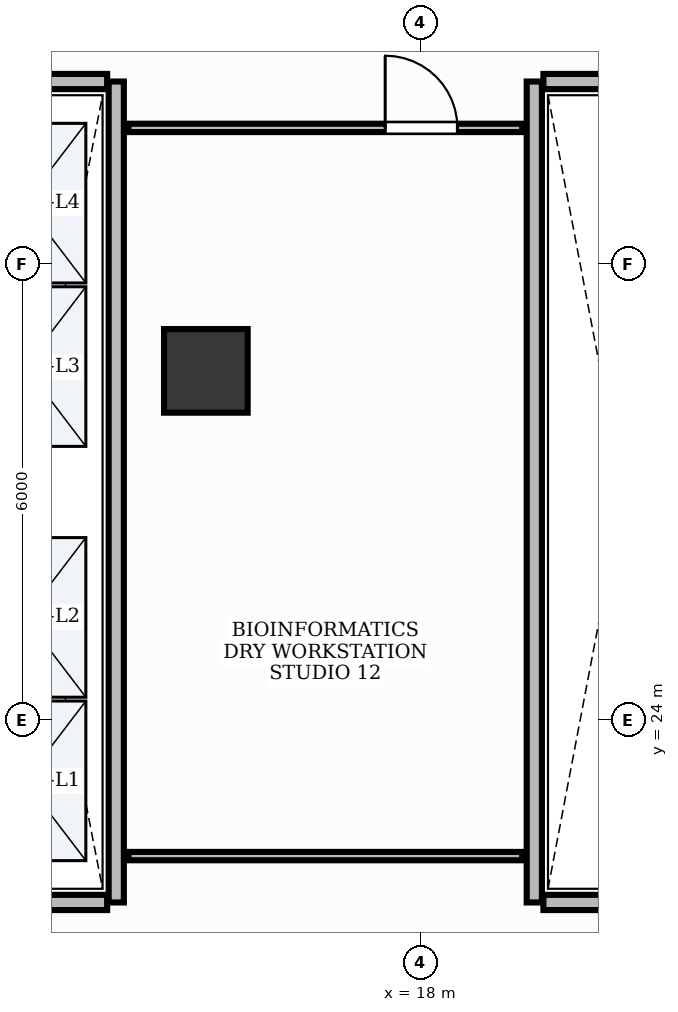
"""IFC4 building model, lengths in metres.
Left out: names, types, materials, properties, quantities, classifications, styles, units other than length and angle.
Written with IfcOpenShell. Run it as: python <this file> out.ifc"""

import sys

from ifc_helpers import new_model, si_unit, direction, frame, frame_2d, origin, origin_2d, place, context, subcontext, project, spatial, rectangle, extrude, element, fill, save


model = new_model("IFC4")
c1 = context("Model", 3, precision=1e-05, world=origin(), true_north=direction((0.0, 1.0)))
c2 = subcontext(c1, "Body", "Model", "MODEL_VIEW")
j1 = project(units=[si_unit("LENGTHUNIT", "METRE"), si_unit("PLANEANGLEUNIT", "RADIAN")], contexts=[c1])
p1 = place(None, origin())
s1 = spatial("IfcSite", under=j1, at=p1, CompositionType="ELEMENT")
p2 = place(p1, origin())
s2 = spatial("IfcBuilding", under=s1, at=p2, CompositionType="ELEMENT")
p3 = place(p2, frame((0.0, 0.0, 80.4)))
s3 = spatial("IfcBuildingStorey", under=s2, at=p3, CompositionType="ELEMENT", Elevation=80.4)
p4 = place(p3, frame((15.179, 28.594, -0.0), z_axis=(0.0, 0.0, 1.0), x_axis=(1.0, 0.0, 0.0)))
e1 = element("IfcColumn", 1, at=p4, inside=s3, PredefinedType="COLUMN", context=c2, shape_type="SweptSolid", body=[
    extrude(rectangle(XDim=1.1, YDim=1.1, at=origin_2d()), origin(), (0.0, 0.0, 1.0), 3.881),
])
p5 = place(p3, frame((14.0, 21.6, 0.0), z_axis=(0.0, 0.0, 1.0), x_axis=(0.0, 1.0, 0.0)))
e2 = element("IfcWall", 2, at=p5, inside=s3, PredefinedType="PARTITIONING", context=c2, shape_type="SweptSolid", body=[
    extrude(rectangle(XDim=10.8, YDim=0.2, at=frame_2d((5.4, 0.0))), origin(), (0.0, 0.0, 1.0), 2.22),
])
for number, where, z_axis, x_axis in (
    (3, (11.72, 21.6, 0.0), (0.0, 0.0, 1.0), (1.0, 0.0, 0.0)),
    (4, (11.72, 32.4, 0.0), (0.0, 0.0, 1.0), (1.0, 0.0, 0.0)),
):
    element("IfcWall", number, at=place(p3, frame(where, z_axis=z_axis, x_axis=x_axis)), inside=s3, PredefinedType="PARTITIONING", context=c2, shape_type="SweptSolid", body=[
        extrude(rectangle(XDim=2.16, YDim=0.2, at=frame_2d((1.08, 0.0))), origin(), (0.0, 0.0, 1.0), 2.22),
    ])
p6 = place(p3, frame((19.5, 21.6, 0.0), z_axis=(0.0, 0.0, 1.0), x_axis=(0.0, 1.0, 0.0)))
e5 = element("IfcWall", 5, at=p6, inside=s3, PredefinedType="PARTITIONING", context=c2, shape_type="SweptSolid", body=[
    extrude(rectangle(XDim=10.8, YDim=0.2, at=frame_2d((5.4, 0.0))), origin(), (0.0, 0.0, 1.0), 2.22),
])
for number, where, z_axis, x_axis in (
    (6, (19.62, 21.6, 0.0), (0.0, 0.0, 1.0), (1.0, 0.0, 0.0)),
    (7, (19.62, 32.4, 0.0), (0.0, 0.0, 1.0), (1.0, 0.0, 0.0)),
):
    element("IfcWall", number, at=place(p3, frame(where, z_axis=z_axis, x_axis=x_axis)), inside=s3, PredefinedType="PARTITIONING", context=c2, shape_type="SweptSolid", body=[
        extrude(rectangle(XDim=2.11, YDim=0.2, at=frame_2d((1.055, 0.0))), origin(), (0.0, 0.0, 1.0), 2.22),
    ])
p7 = place(p3, frame((14.16, 31.79, 0.0), z_axis=(0.0, 0.0, 1.0), x_axis=(1.0, 0.0, 0.0)))
e8 = element("IfcWall", 8, at=p7, inside=s3, PredefinedType="MOVABLE", context=c2, shape_type="SweptSolid", body=[
    extrude(rectangle(XDim=5.18, YDim=0.11, at=frame_2d((2.59, 0.0))), origin(), (0.0, 0.0, 1.0), 2.22),
])
p8 = place(p7, frame((3.378, 0.0, 0.0)))
e9 = element("IfcOpeningElement", 9, at=p8, cuts=e8, PredefinedType="OPENING", context=c2, shape_type="SweptSolid", body=[
    extrude(rectangle(XDim=0.95, YDim=2.15, at=frame_2d((0.475, 1.075))), frame((0.0, 0.07, 0.0), z_axis=(0.0, -1.0, 0.0), x_axis=(1.0, 0.0, 0.0)), (0.0, 0.0, 1.0), 0.14),
])
p9 = place(p3, frame((19.34, 22.21, 0.0), z_axis=(0.0, 0.0, 1.0), x_axis=(-1.0, 0.0, 0.0)))
e10 = element("IfcWall", 10, at=p9, inside=s3, PredefinedType="MOVABLE", context=c2, shape_type="SweptSolid", body=[
    extrude(rectangle(XDim=5.18, YDim=0.11, at=frame_2d((2.59, 0.0))), origin(), (0.0, 0.0, 1.0), 2.22),
])
p10 = place(p8, origin())
e11 = element("IfcDoor", 11, at=p10, inside=s3, OperationType="SINGLE_SWING_LEFT", PredefinedType="DOOR", context=c2, shape_type="SweptSolid", body=[
    extrude(rectangle(XDim=0.95, YDim=2.15, at=frame_2d((0.475, 1.075))), frame((0.0, 0.025, 0.0), z_axis=(0.0, -1.0, 0.0), x_axis=(1.0, 0.0, 0.0)), (0.0, 0.0, 1.0), 0.05),
])
fill(e9, e11)
save(model, sys.argv[1])
